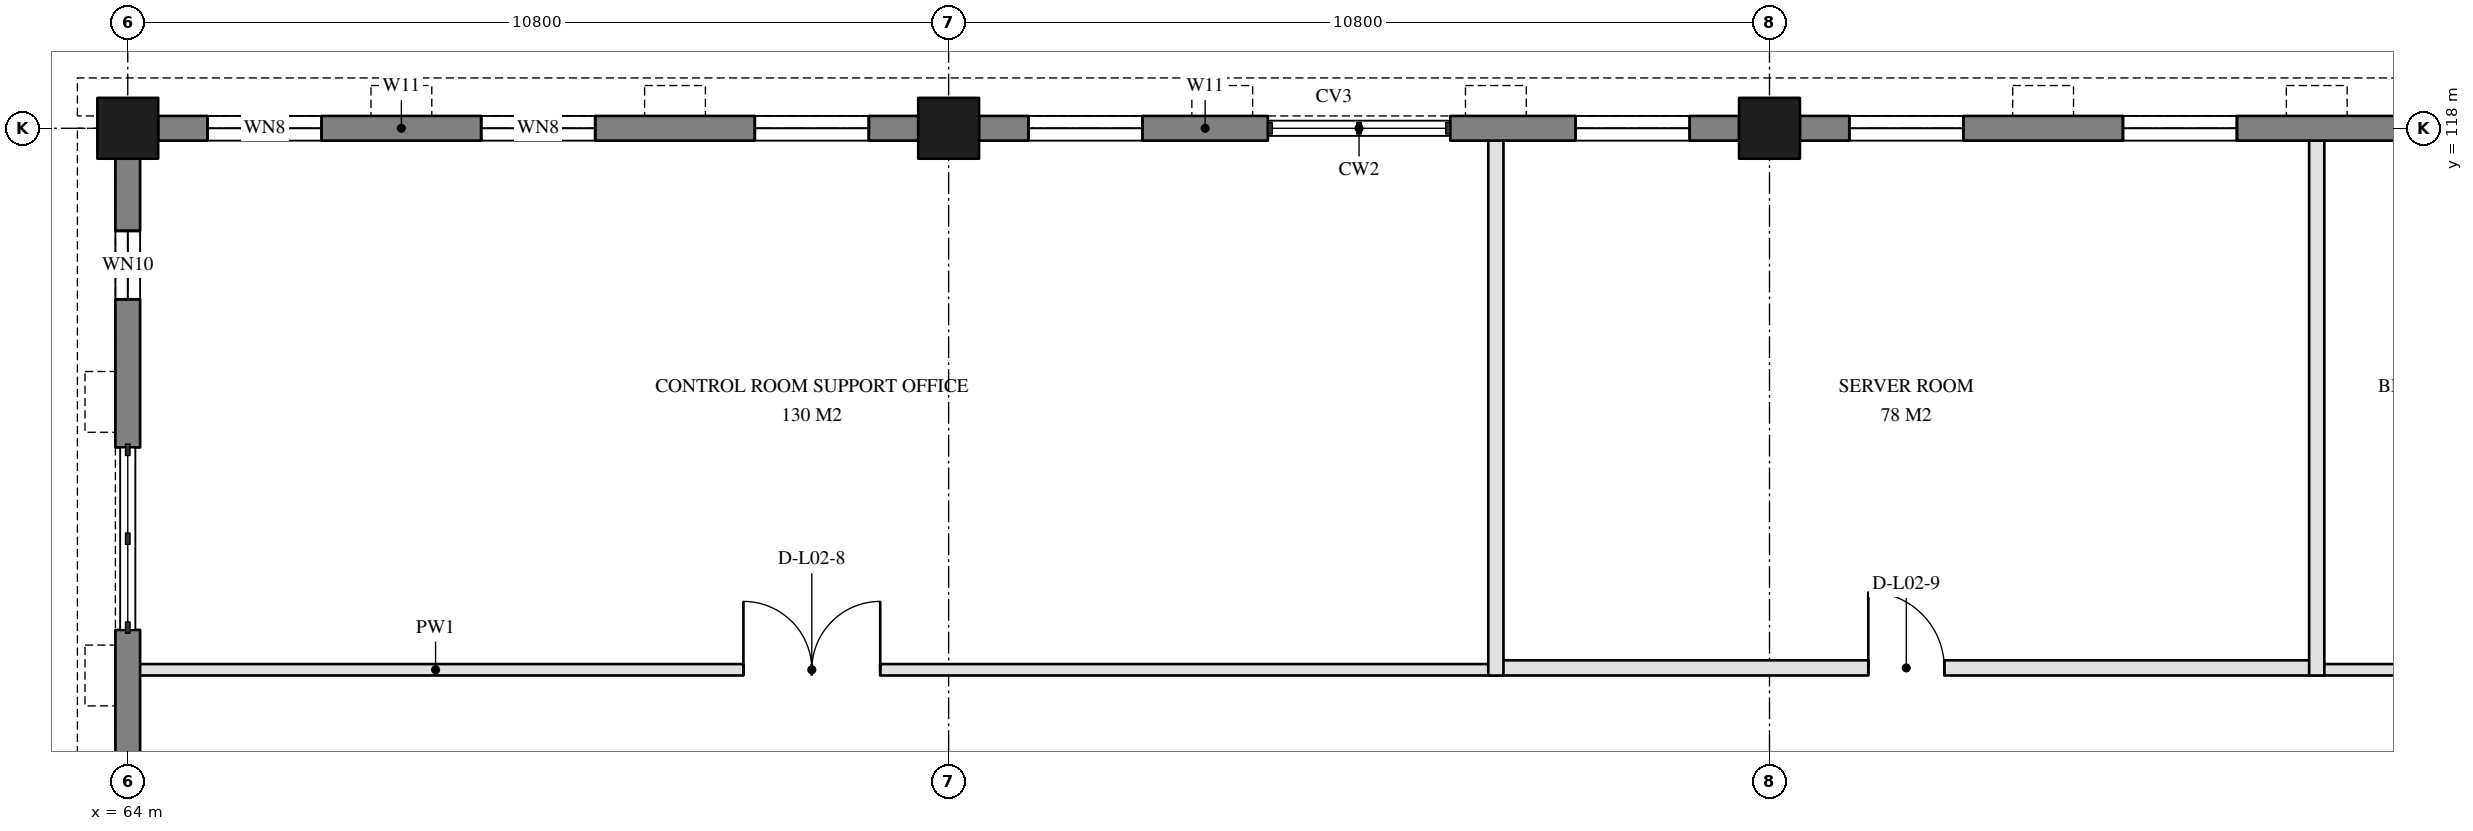
"""IFC4 building model, lengths in metres.
Left out: names, types, materials, properties, quantities, classifications, styles, units other than length and angle.
Written with IfcOpenShell. Run it as: python <this file> out.ifc"""

import sys

from ifc_helpers import new_model, si_unit, direction, frame, frame_2d, origin, origin_2d, place, context, subcontext, project, spatial, rectangle, extrude, element, fill, save


model = new_model("IFC4")
c1 = context("Model", 3, precision=1e-05, world=origin(), true_north=direction((0.0, 1.0)))
c2 = subcontext(c1, "Body", "Model", "MODEL_VIEW")
j1 = project(units=[si_unit("LENGTHUNIT", "METRE"), si_unit("PLANEANGLEUNIT", "RADIAN")], contexts=[c1])
p1 = place(None, origin())
s1 = spatial("IfcSite", under=j1, at=p1, CompositionType="ELEMENT")
p2 = place(p1, origin())
s2 = spatial("IfcBuilding", under=s1, at=p2, CompositionType="ELEMENT")
p3 = place(p2, frame((0.0, 0.0, 8.7)))
s3 = spatial("IfcBuildingStorey", under=s2, at=p3, CompositionType="ELEMENT", Elevation=8.7)
for number, where, z_axis, x_axis in (
    (1, (64.0, 118.0, 0.0), (0.0, 0.0, 1.0), (1.0, 0.0, 0.0)),
    (2, (74.8, 118.0, 0.0), (0.0, 0.0, 1.0), (1.0, 0.0, 0.0)),
    (3, (85.6, 118.0, 0.0), (0.0, 0.0, 1.0), (1.0, 0.0, 0.0)),
):
    element("IfcColumn", number, at=place(p3, frame(where, z_axis=z_axis, x_axis=x_axis)), inside=s3, PredefinedType="COLUMN", context=c2, shape_type="SweptSolid", body=[
        extrude(rectangle(XDim=0.8, YDim=0.8, at=origin_2d()), origin(), (0.0, 0.0, 1.0), 3.9),
    ])
p4 = place(p3, frame((64.4, 118.0, 0.0), z_axis=(0.0, 0.0, 1.0), x_axis=(1.0, 0.0, 0.0)))
e4 = element("IfcWall", 4, at=p4, inside=s3, PredefinedType="SOLIDWALL", context=c2, shape_type="SweptSolid", body=[
    extrude(rectangle(XDim=10.0, YDim=0.325, at=frame_2d((5.0, 0.0))), origin(), (0.0, 0.0, 1.0), 2.8),
])
p5 = place(p4, frame((0.65, 0.0, 0.6)))
e5 = element("IfcOpeningElement", 5, at=p5, cuts=e4, PredefinedType="OPENING", context=c2, shape_type="SweptSolid", body=[
    extrude(rectangle(XDim=1.5, YDim=2.1, at=frame_2d((0.75, 1.05))), frame((0.0, 0.172, 0.0), z_axis=(0.0, -1.0, 0.0), x_axis=(1.0, 0.0, 0.0)), (0.0, 0.0, 1.0), 0.345),
])
p6 = place(p4, frame((4.25, 0.0, 0.6)))
e6 = element("IfcOpeningElement", 6, at=p6, cuts=e4, PredefinedType="OPENING", context=c2, shape_type="SweptSolid", body=[
    extrude(rectangle(XDim=1.5, YDim=2.1, at=frame_2d((0.75, 1.05))), frame((0.0, 0.172, 0.0), z_axis=(0.0, -1.0, 0.0), x_axis=(1.0, 0.0, 0.0)), (0.0, 0.0, 1.0), 0.345),
])
p7 = place(p4, frame((7.85, 0.0, 0.6)))
e7 = element("IfcOpeningElement", 7, at=p7, cuts=e4, PredefinedType="OPENING", context=c2, shape_type="SweptSolid", body=[
    extrude(rectangle(XDim=1.5, YDim=2.1, at=frame_2d((0.75, 1.05))), frame((0.0, 0.172, 0.0), z_axis=(0.0, -1.0, 0.0), x_axis=(1.0, 0.0, 0.0)), (0.0, 0.0, 1.0), 0.345),
])
p8 = place(p3, frame((75.2, 118.0, 0.0), z_axis=(0.0, 0.0, 1.0), x_axis=(1.0, 0.0, 0.0)))
e8 = element("IfcWall", 8, at=p8, inside=s3, PredefinedType="SOLIDWALL", context=c2, shape_type="SweptSolid", body=[
    extrude(rectangle(XDim=3.8, YDim=0.325, at=frame_2d((1.9, 0.0))), origin(), (0.0, 0.0, 1.0), 2.8),
])
p9 = place(p8, frame((0.65, 0.0, 0.6)))
e9 = element("IfcOpeningElement", 9, at=p9, cuts=e8, PredefinedType="OPENING", context=c2, shape_type="SweptSolid", body=[
    extrude(rectangle(XDim=1.5, YDim=2.1, at=frame_2d((0.75, 1.05))), frame((0.0, 0.172, 0.0), z_axis=(0.0, -1.0, 0.0), x_axis=(1.0, 0.0, 0.0)), (0.0, 0.0, 1.0), 0.345),
])
p10 = place(p3, frame((81.4, 118.0, 0.0), z_axis=(0.0, 0.0, 1.0), x_axis=(1.0, 0.0, 0.0)))
e10 = element("IfcWall", 10, at=p10, inside=s3, PredefinedType="SOLIDWALL", context=c2, shape_type="SweptSolid", body=[
    extrude(rectangle(XDim=3.8, YDim=0.325, at=frame_2d((1.9, 0.0))), origin(), (0.0, 0.0, 1.0), 2.8),
])
p11 = place(p10, frame((1.65, 0.0, 0.6)))
e11 = element("IfcOpeningElement", 11, at=p11, cuts=e10, PredefinedType="OPENING", context=c2, shape_type="SweptSolid", body=[
    extrude(rectangle(XDim=1.5, YDim=2.1, at=frame_2d((0.75, 1.05))), frame((0.0, 0.172, 0.0), z_axis=(0.0, -1.0, 0.0), x_axis=(1.0, 0.0, 0.0)), (0.0, 0.0, 1.0), 0.345),
])
p12 = place(p3, frame((86.0, 118.0, 0.0), z_axis=(0.0, 0.0, 1.0), x_axis=(1.0, 0.0, 0.0)))
e12 = element("IfcWall", 12, at=p12, inside=s3, PredefinedType="SOLIDWALL", context=c2, shape_type="SweptSolid", body=[
    extrude(rectangle(XDim=10.0, YDim=0.325, at=frame_2d((5.0, 0.0))), origin(), (0.0, 0.0, 1.0), 2.8),
])
p13 = place(p12, frame((0.65, 0.0, 0.6)))
e13 = element("IfcOpeningElement", 13, at=p13, cuts=e12, PredefinedType="OPENING", context=c2, shape_type="SweptSolid", body=[
    extrude(rectangle(XDim=1.5, YDim=2.1, at=frame_2d((0.75, 1.05))), frame((0.0, 0.172, 0.0), z_axis=(0.0, -1.0, 0.0), x_axis=(1.0, 0.0, 0.0)), (0.0, 0.0, 1.0), 0.345),
])
p14 = place(p12, frame((4.25, 0.0, 0.6)))
e14 = element("IfcOpeningElement", 14, at=p14, cuts=e12, PredefinedType="OPENING", context=c2, shape_type="SweptSolid", body=[
    extrude(rectangle(XDim=1.5, YDim=2.1, at=frame_2d((0.75, 1.05))), frame((0.0, 0.172, 0.0), z_axis=(0.0, -1.0, 0.0), x_axis=(1.0, 0.0, 0.0)), (0.0, 0.0, 1.0), 0.345),
])
p15 = place(p12, frame((7.85, 0.0, 0.6)))
e15 = element("IfcOpeningElement", 15, at=p15, cuts=e12, PredefinedType="OPENING", context=c2, shape_type="SweptSolid", body=[
    extrude(rectangle(XDim=1.5, YDim=2.1, at=frame_2d((0.75, 1.05))), frame((0.0, 0.172, 0.0), z_axis=(0.0, -1.0, 0.0), x_axis=(1.0, 0.0, 0.0)), (0.0, 0.0, 1.0), 0.345),
])
p16 = place(p3, frame((64.0, 107.6, 0.0), z_axis=(0.0, 0.0, 1.0), x_axis=(0.0, 1.0, 0.0)))
e16 = element("IfcWall", 16, at=p16, inside=s3, PredefinedType="SOLIDWALL", context=c2, shape_type="SweptSolid", body=[
    extrude(rectangle(XDim=3.8, YDim=0.325, at=frame_2d((1.9, 0.0))), origin(), (0.0, 0.0, 1.0), 2.8),
])
p17 = place(p16, frame((0.95, 0.0, 0.7)))
e17 = element("IfcOpeningElement", 17, at=p17, cuts=e16, PredefinedType="OPENING", context=c2, shape_type="SweptSolid", body=[
    extrude(rectangle(XDim=0.9, YDim=2.0, at=frame_2d((0.45, 1.0))), frame((0.0, 0.172, 0.0), z_axis=(0.0, -1.0, 0.0), x_axis=(1.0, 0.0, 0.0)), (0.0, 0.0, 1.0), 0.345),
])
p18 = place(p3, frame((64.0, 113.8, 0.0), z_axis=(0.0, 0.0, 1.0), x_axis=(0.0, 1.0, 0.0)))
e18 = element("IfcWall", 18, at=p18, inside=s3, PredefinedType="SOLIDWALL", context=c2, shape_type="SweptSolid", body=[
    extrude(rectangle(XDim=3.8, YDim=0.325, at=frame_2d((1.9, 0.0))), origin(), (0.0, 0.0, 1.0), 2.8),
])
p19 = place(p18, frame((1.95, 0.0, 0.7)))
e19 = element("IfcOpeningElement", 19, at=p19, cuts=e18, PredefinedType="OPENING", context=c2, shape_type="SweptSolid", body=[
    extrude(rectangle(XDim=0.9, YDim=2.0, at=frame_2d((0.45, 1.0))), frame((0.0, 0.172, 0.0), z_axis=(0.0, -1.0, 0.0), x_axis=(1.0, 0.0, 0.0)), (0.0, 0.0, 1.0), 0.345),
])
p20 = place(p3, frame((64.0, 110.875, 0.0), z_axis=(0.0, 0.0, 1.0), x_axis=(1.0, 0.0, 0.0)))
e20 = element("IfcWall", 20, at=p20, inside=s3, PredefinedType="PARTITIONING", context=c2, shape_type="SweptSolid", body=[
    extrude(rectangle(XDim=18.0, YDim=0.15, at=frame_2d((9.0, 0.0))), origin(), (0.0, 0.0, 1.0), 2.8),
])
p21 = place(p20, frame((8.1, 0.0, 0.0)))
e21 = element("IfcOpeningElement", 21, at=p21, cuts=e20, PredefinedType="OPENING", context=c2, shape_type="SweptSolid", body=[
    extrude(rectangle(XDim=1.8, YDim=2.1, at=frame_2d((0.9, 1.05))), frame((0.0, 0.085, 0.0), z_axis=(0.0, -1.0, 0.0), x_axis=(1.0, 0.0, 0.0)), (0.0, 0.0, 1.0), 0.17),
])
p22 = place(p3, frame((82.0, 110.9, 0.0), z_axis=(0.0, 0.0, 1.0), x_axis=(1.0, 0.0, 0.0)))
e22 = element("IfcWall", 22, at=p22, inside=s3, PredefinedType="PARTITIONING", context=c2, shape_type="SweptSolid", body=[
    extrude(rectangle(XDim=10.8, YDim=0.2, at=frame_2d((5.4, 0.0))), origin(), (0.0, 0.0, 1.0), 2.8),
])
p23 = place(p22, frame((4.9, 0.0, 0.0)))
e23 = element("IfcOpeningElement", 23, at=p23, cuts=e22, PredefinedType="OPENING", context=c2, shape_type="SweptSolid", body=[
    extrude(rectangle(XDim=1.0, YDim=2.1, at=frame_2d((0.5, 1.05))), frame((0.0, 0.11, 0.0), z_axis=(0.0, -1.0, 0.0), x_axis=(1.0, 0.0, 0.0)), (0.0, 0.0, 1.0), 0.22),
])
p24 = place(p3, frame((92.8, 110.875, 0.0), z_axis=(0.0, 0.0, 1.0), x_axis=(1.0, 0.0, 0.0)))
e24 = element("IfcWall", 24, at=p24, inside=s3, PredefinedType="PARTITIONING", context=c2, shape_type="SweptSolid", body=[
    extrude(rectangle(XDim=14.4, YDim=0.15, at=frame_2d((7.2, 0.0))), origin(), (0.0, 0.0, 1.0), 2.8),
])
p25 = place(p24, frame((6.3, 0.0, 0.0)))
e25 = element("IfcOpeningElement", 25, at=p25, cuts=e24, PredefinedType="OPENING", context=c2, shape_type="SweptSolid", body=[
    extrude(rectangle(XDim=1.8, YDim=2.1, at=frame_2d((0.9, 1.05))), frame((0.0, 0.085, 0.0), z_axis=(0.0, -1.0, 0.0), x_axis=(1.0, 0.0, 0.0)), (0.0, 0.0, 1.0), 0.17),
])
for number, where, z_axis, x_axis in (
    (26, (82.0, 110.8, 0.0), (0.0, 0.0, 1.0), (0.0, 1.0, 0.0)),
    (27, (92.8, 110.8, 0.0), (0.0, 0.0, 1.0), (0.0, 1.0, 0.0)),
):
    element("IfcWall", number, at=place(p3, frame(where, z_axis=z_axis, x_axis=x_axis)), inside=s3, PredefinedType="PARTITIONING", context=c2, shape_type="SweptSolid", body=[
        extrude(rectangle(XDim=7.2, YDim=0.2, at=frame_2d((3.6, 0.0))), origin(), (0.0, 0.0, 1.0), 2.8),
    ])
p26 = place(p5, origin())
e28 = element("IfcWindow", 28, at=p26, inside=s3, PartitioningType="SINGLE_PANEL", PredefinedType="WINDOW", context=c2, shape_type="SweptSolid", body=[
    extrude(rectangle(XDim=1.5, YDim=2.1, at=frame_2d((0.75, 1.05))), frame((0.0, 0.03, 0.0), z_axis=(0.0, -1.0, 0.0), x_axis=(1.0, 0.0, 0.0)), (0.0, 0.0, 1.0), 0.06),
])
fill(e5, e28)
p27 = place(p6, origin())
e29 = element("IfcWindow", 29, at=p27, inside=s3, PartitioningType="SINGLE_PANEL", PredefinedType="WINDOW", context=c2, shape_type="SweptSolid", body=[
    extrude(rectangle(XDim=1.5, YDim=2.1, at=frame_2d((0.75, 1.05))), frame((0.0, 0.03, 0.0), z_axis=(0.0, -1.0, 0.0), x_axis=(1.0, 0.0, 0.0)), (0.0, 0.0, 1.0), 0.06),
])
fill(e6, e29)
p28 = place(p7, origin())
e30 = element("IfcWindow", 30, at=p28, inside=s3, PartitioningType="SINGLE_PANEL", PredefinedType="WINDOW", context=c2, shape_type="SweptSolid", body=[
    extrude(rectangle(XDim=1.5, YDim=2.1, at=frame_2d((0.75, 1.05))), frame((0.0, 0.03, 0.0), z_axis=(0.0, -1.0, 0.0), x_axis=(1.0, 0.0, 0.0)), (0.0, 0.0, 1.0), 0.06),
])
fill(e7, e30)
p29 = place(p9, origin())
e31 = element("IfcWindow", 31, at=p29, inside=s3, PartitioningType="SINGLE_PANEL", PredefinedType="WINDOW", context=c2, shape_type="SweptSolid", body=[
    extrude(rectangle(XDim=1.5, YDim=2.1, at=frame_2d((0.75, 1.05))), frame((0.0, 0.03, 0.0), z_axis=(0.0, -1.0, 0.0), x_axis=(1.0, 0.0, 0.0)), (0.0, 0.0, 1.0), 0.06),
])
fill(e9, e31)
p30 = place(p11, origin())
e32 = element("IfcWindow", 32, at=p30, inside=s3, PartitioningType="SINGLE_PANEL", PredefinedType="WINDOW", context=c2, shape_type="SweptSolid", body=[
    extrude(rectangle(XDim=1.5, YDim=2.1, at=frame_2d((0.75, 1.05))), frame((0.0, 0.03, 0.0), z_axis=(0.0, -1.0, 0.0), x_axis=(1.0, 0.0, 0.0)), (0.0, 0.0, 1.0), 0.06),
])
fill(e11, e32)
p31 = place(p13, origin())
e33 = element("IfcWindow", 33, at=p31, inside=s3, PartitioningType="SINGLE_PANEL", PredefinedType="WINDOW", context=c2, shape_type="SweptSolid", body=[
    extrude(rectangle(XDim=1.5, YDim=2.1, at=frame_2d((0.75, 1.05))), frame((0.0, 0.03, 0.0), z_axis=(0.0, -1.0, 0.0), x_axis=(1.0, 0.0, 0.0)), (0.0, 0.0, 1.0), 0.06),
])
fill(e13, e33)
p32 = place(p14, origin())
e34 = element("IfcWindow", 34, at=p32, inside=s3, PartitioningType="SINGLE_PANEL", PredefinedType="WINDOW", context=c2, shape_type="SweptSolid", body=[
    extrude(rectangle(XDim=1.5, YDim=2.1, at=frame_2d((0.75, 1.05))), frame((0.0, 0.03, 0.0), z_axis=(0.0, -1.0, 0.0), x_axis=(1.0, 0.0, 0.0)), (0.0, 0.0, 1.0), 0.06),
])
fill(e14, e34)
p33 = place(p19, origin())
e35 = element("IfcWindow", 35, at=p33, inside=s3, PartitioningType="SINGLE_PANEL", PredefinedType="WINDOW", context=c2, shape_type="SweptSolid", body=[
    extrude(rectangle(XDim=0.9, YDim=2.0, at=frame_2d((0.45, 1.0))), frame((0.0, 0.03, 0.0), z_axis=(0.0, -1.0, 0.0), x_axis=(1.0, 0.0, 0.0)), (0.0, 0.0, 1.0), 0.06),
])
fill(e19, e35)
p34 = place(p21, origin())
e36 = element("IfcDoor", 36, at=p34, inside=s3, OperationType="DOUBLE_DOOR_DOUBLE_SWING", PredefinedType="DOOR", context=c2, shape_type="SweptSolid", body=[
    extrude(rectangle(XDim=1.8, YDim=2.1, at=frame_2d((0.9, 1.05))), frame((0.0, 0.025, 0.0), z_axis=(0.0, -1.0, 0.0), x_axis=(1.0, 0.0, 0.0)), (0.0, 0.0, 1.0), 0.05),
])
fill(e21, e36)
p35 = place(p23, origin())
e37 = element("IfcDoor", 37, at=p35, inside=s3, OperationType="SINGLE_SWING_RIGHT", PredefinedType="DOOR", context=c2, shape_type="SweptSolid", body=[
    extrude(rectangle(XDim=1.0, YDim=2.1, at=frame_2d((0.5, 1.05))), frame((0.0, 0.025, 0.0), z_axis=(0.0, -1.0, 0.0), x_axis=(1.0, 0.0, 0.0)), (0.0, 0.0, 1.0), 0.05),
])
fill(e23, e37)
save(model, sys.argv[1])
